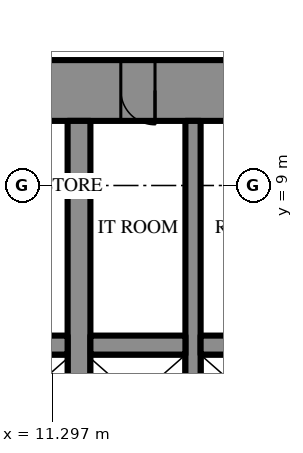
"""IFC4 building model, lengths in metres.
Left out: names, types, materials, properties, quantities, classifications, styles, units other than length and angle.
Written with IfcOpenShell. Run it as: python <this file> out.ifc"""

import sys

from ifc_helpers import new_model, si_unit, direction, frame, frame_2d, origin, place, context, subcontext, project, spatial, rectangle, extrude, element, fill, save


model = new_model("IFC4")
c1 = context("Model", 3, precision=1e-05, world=origin(), true_north=direction((0.0, 1.0)))
c2 = subcontext(c1, "Body", "Model", "MODEL_VIEW")
j1 = project(units=[si_unit("LENGTHUNIT", "METRE"), si_unit("PLANEANGLEUNIT", "RADIAN")], contexts=[c1])
p1 = place(None, origin())
s1 = spatial("IfcSite", under=j1, at=p1, CompositionType="ELEMENT")
p2 = place(p1, origin())
s2 = spatial("IfcBuilding", under=s1, at=p2, CompositionType="ELEMENT")
p3 = place(p2, frame((0.0, 0.0, 69.7)))
s3 = spatial("IfcBuildingStorey", under=s2, at=p3, CompositionType="ELEMENT", Elevation=69.7)
p4 = place(p3, frame((-18.6, 11.5, 0.0), z_axis=(0.0, 0.0, 1.0), x_axis=(1.0, 0.0, 0.0)))
e1 = element("IfcWall", 1, at=p4, inside=s3, PredefinedType="SHEAR", context=c2, shape_type="SweptSolid", body=[
    extrude(rectangle(XDim=37.2, YDim=1.6, at=frame_2d((18.6, 0.0))), origin(), (0.0, 0.0, 1.0), 4.2),
])
p5 = place(p4, frame((19.45, 0.0, 0.0)))
e2 = element("IfcOpeningElement", 2, at=p5, cuts=e1, PredefinedType="OPENING", context=c2, shape_type="SweptSolid", body=[
    extrude(rectangle(XDim=0.9, YDim=2.2, at=frame_2d((0.45, 1.1))), frame((0.0, 0.81, 0.0), z_axis=(0.0, -1.0, 0.0), x_axis=(1.0, 0.0, 0.0)), (0.0, 0.0, 1.0), 1.62),
])
p6 = place(p4, frame((22.45, 0.0, 0.0)))
e3 = element("IfcOpeningElement", 3, at=p6, cuts=e1, PredefinedType="OPENING", context=c2, shape_type="SweptSolid", body=[
    extrude(rectangle(XDim=0.9, YDim=2.2, at=frame_2d((0.45, 1.1))), frame((0.0, 0.81, 0.0), z_axis=(0.0, -1.0, 0.0), x_axis=(1.0, 0.0, 0.0)), (0.0, 0.0, 1.0), 1.62),
])
p7 = place(p4, frame((25.5, 0.0, 0.0)))
e4 = element("IfcOpeningElement", 4, at=p7, cuts=e1, PredefinedType="OPENING", context=c2, shape_type="SweptSolid", body=[
    extrude(rectangle(XDim=1.0, YDim=2.2, at=frame_2d((0.5, 1.1))), frame((0.0, 0.81, 0.0), z_axis=(0.0, -1.0, 0.0), x_axis=(1.0, 0.0, 0.0)), (0.0, 0.0, 1.0), 1.62),
])
p8 = place(p4, frame((1.85, 0.0, 0.0)))
e5 = element("IfcOpeningElement", 5, at=p8, cuts=e1, PredefinedType="OPENING", context=c2, shape_type="SweptSolid", body=[
    extrude(rectangle(XDim=0.9, YDim=2.2, at=frame_2d((0.45, 1.1))), frame((0.0, 0.81, 0.0), z_axis=(0.0, -1.0, 0.0), x_axis=(1.0, 0.0, 0.0)), (0.0, 0.0, 1.0), 1.62),
])
p9 = place(p4, frame((4.6, 0.0, 0.0)))
e6 = element("IfcOpeningElement", 6, at=p9, cuts=e1, PredefinedType="OPENING", context=c2, shape_type="SweptSolid", body=[
    extrude(rectangle(XDim=0.9, YDim=2.2, at=frame_2d((0.45, 1.1))), frame((0.0, 0.81, 0.0), z_axis=(0.0, -1.0, 0.0), x_axis=(1.0, 0.0, 0.0)), (0.0, 0.0, 1.0), 1.62),
])
p10 = place(p4, frame((7.75, 0.0, 0.0)))
e7 = element("IfcOpeningElement", 7, at=p10, cuts=e1, PredefinedType="OPENING", context=c2, shape_type="SweptSolid", body=[
    extrude(rectangle(XDim=0.9, YDim=2.2, at=frame_2d((0.45, 1.1))), frame((0.0, 0.81, 0.0), z_axis=(0.0, -1.0, 0.0), x_axis=(1.0, 0.0, 0.0)), (0.0, 0.0, 1.0), 1.62),
])
p11 = place(p4, frame((28.55, 0.0, 0.0)))
e8 = element("IfcOpeningElement", 8, at=p11, cuts=e1, PredefinedType="OPENING", context=c2, shape_type="SweptSolid", body=[
    extrude(rectangle(XDim=0.9, YDim=2.2, at=frame_2d((0.45, 1.1))), frame((0.0, 0.81, 0.0), z_axis=(0.0, -1.0, 0.0), x_axis=(1.0, 0.0, 0.0)), (0.0, 0.0, 1.0), 1.62),
])
p12 = place(p4, frame((31.7, 0.0, 0.0)))
e9 = element("IfcOpeningElement", 9, at=p12, cuts=e1, PredefinedType="OPENING", context=c2, shape_type="SweptSolid", body=[
    extrude(rectangle(XDim=0.9, YDim=2.2, at=frame_2d((0.45, 1.1))), frame((0.0, 0.81, 0.0), z_axis=(0.0, -1.0, 0.0), x_axis=(1.0, 0.0, 0.0)), (0.0, 0.0, 1.0), 1.62),
])
p13 = place(p4, frame((34.45, 0.0, 0.0)))
e10 = element("IfcOpeningElement", 10, at=p13, cuts=e1, PredefinedType="OPENING", context=c2, shape_type="SweptSolid", body=[
    extrude(rectangle(XDim=0.9, YDim=2.2, at=frame_2d((0.45, 1.1))), frame((0.0, 0.81, 0.0), z_axis=(0.0, -1.0, 0.0), x_axis=(1.0, 0.0, 0.0)), (0.0, 0.0, 1.0), 1.62),
])
p14 = place(p3, frame((12.0, -10.7, 0.0), z_axis=(0.0, 0.0, 1.0), x_axis=(0.0, 1.0, 0.0)))
e11 = element("IfcWall", 11, at=p14, inside=s3, PredefinedType="SHEAR", context=c2, shape_type="SweptSolid", body=[
    extrude(rectangle(XDim=21.4, YDim=0.6, at=frame_2d((10.7, 0.0))), origin(), (0.0, 0.0, 1.0), 4.2),
])
p15 = place(p14, frame((9.8, 0.0, 0.0)))
e12 = element("IfcOpeningElement", 12, at=p15, cuts=e11, PredefinedType="OPENING", context=c2, shape_type="SweptSolid", body=[
    extrude(rectangle(XDim=1.8, YDim=2.4, at=frame_2d((0.9, 1.2))), frame((0.0, 0.31, 0.0), z_axis=(0.0, -1.0, 0.0), x_axis=(1.0, 0.0, 0.0)), (0.0, 0.0, 1.0), 0.62),
])
p16 = place(p3, frame((15.0, -10.7, 0.0), z_axis=(0.0, 0.0, 1.0), x_axis=(0.0, 1.0, 0.0)))
e13 = element("IfcWall", 13, at=p16, inside=s3, PredefinedType="SHEAR", context=c2, shape_type="SweptSolid", body=[
    extrude(rectangle(XDim=21.4, YDim=0.4, at=frame_2d((10.7, 0.0))), origin(), (0.0, 0.0, 1.0), 4.2),
])
p17 = place(p16, frame((9.8, 0.0, 0.0)))
e14 = element("IfcOpeningElement", 14, at=p17, cuts=e13, PredefinedType="OPENING", context=c2, shape_type="SweptSolid", body=[
    extrude(rectangle(XDim=1.8, YDim=2.4, at=frame_2d((0.9, 1.2))), frame((0.0, 0.21, 0.0), z_axis=(0.0, -1.0, 0.0), x_axis=(1.0, 0.0, 0.0)), (0.0, 0.0, 1.0), 0.42),
])
p18 = place(p3, frame((-11.7, 4.8, 0.0), z_axis=(0.0, 0.0, 1.0), x_axis=(1.0, 0.0, 0.0)))
e15 = element("IfcWall", 15, at=p18, inside=s3, PredefinedType="SHEAR", context=c2, shape_type="SweptSolid", body=[
    extrude(rectangle(XDim=23.4, YDim=0.5, at=frame_2d((11.7, 0.0))), origin(), (0.0, 0.0, 1.0), 4.2),
])
p19 = place(p18, frame((6.6, 0.0, 0.0)))
e16 = element("IfcOpeningElement", 16, at=p19, cuts=e15, PredefinedType="OPENING", context=c2, shape_type="SweptSolid", body=[
    extrude(rectangle(XDim=1.2, YDim=2.2, at=frame_2d((0.6, 1.1))), frame((0.0, 0.26, 0.0), z_axis=(0.0, -1.0, 0.0), x_axis=(1.0, 0.0, 0.0)), (0.0, 0.0, 1.0), 0.52),
])
p20 = place(p18, frame((3.6, 0.0, 0.0)))
e17 = element("IfcOpeningElement", 17, at=p20, cuts=e15, PredefinedType="OPENING", context=c2, shape_type="SweptSolid", body=[
    extrude(rectangle(XDim=1.2, YDim=2.2, at=frame_2d((0.6, 1.1))), frame((0.0, 0.26, 0.0), z_axis=(0.0, -1.0, 0.0), x_axis=(1.0, 0.0, 0.0)), (0.0, 0.0, 1.0), 0.52),
])
p21 = place(p3, frame((12.3, 4.8, 0.0), z_axis=(0.0, 0.0, 1.0), x_axis=(1.0, 0.0, 0.0)))
e18 = element("IfcWall", 18, at=p21, inside=s3, PredefinedType="SHEAR", context=c2, shape_type="SweptSolid", body=[
    extrude(rectangle(XDim=2.5, YDim=0.5, at=frame_2d((1.25, 0.0))), origin(), (0.0, 0.0, 1.0), 4.2),
])
p22 = place(p3, frame((15.2, 4.8, 0.0), z_axis=(0.0, 0.0, 1.0), x_axis=(1.0, 0.0, 0.0)))
e19 = element("IfcWall", 19, at=p22, inside=s3, PredefinedType="SHEAR", context=c2, shape_type="SweptSolid", body=[
    extrude(rectangle(XDim=2.2, YDim=0.5, at=frame_2d((1.1, 0.0))), origin(), (0.0, 0.0, 1.0), 4.2),
])
p23 = place(p12, frame((0.9, 0.0, 0.0), z_axis=(0.0, 0.0, 1.0), x_axis=(-1.0, 0.0, 0.0)))
e20 = element("IfcDoor", 20, at=p23, inside=s3, OperationType="SINGLE_SWING_RIGHT", PredefinedType="DOOR", context=c2, shape_type="SweptSolid", body=[
    extrude(rectangle(XDim=0.9, YDim=2.2, at=frame_2d((0.45, 1.1))), frame((0.0, 0.025, 0.0), z_axis=(0.0, -1.0, 0.0), x_axis=(1.0, 0.0, 0.0)), (0.0, 0.0, 1.0), 0.05),
])
fill(e9, e20)
save(model, sys.argv[1])
